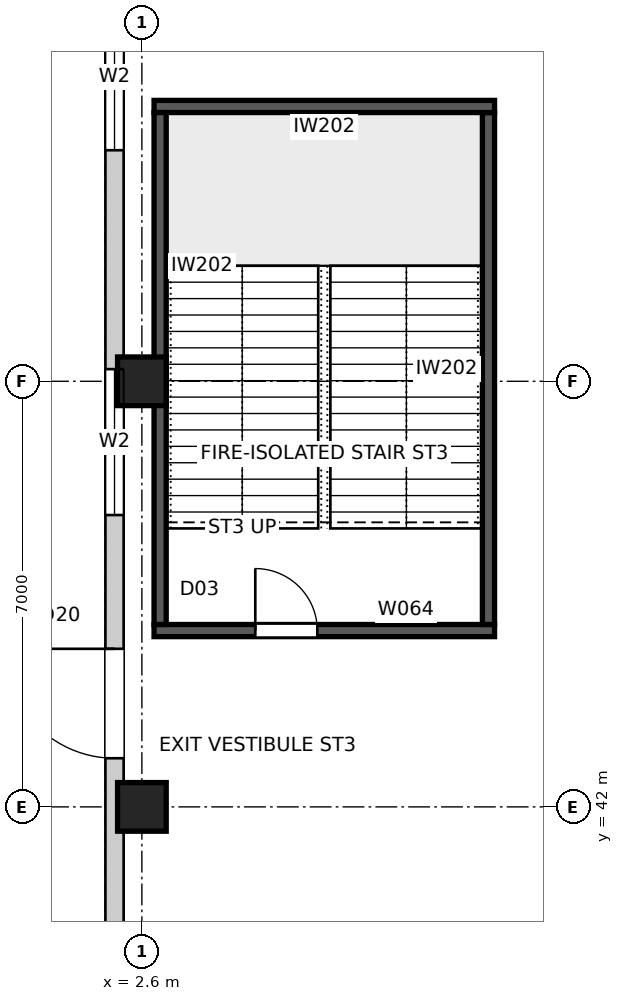
"""IFC4 building model, lengths in metres.
Left out: names, types, materials, properties, quantities, classifications, styles, units other than length and angle.
Written with IfcOpenShell. Run it as: python <this file> out.ifc"""

import sys

from ifc_helpers import new_model, si_unit, direction, frame, frame_2d, origin, origin_2d, place, context, subcontext, project, spatial, rectangle, extrude, element, fill, save


model = new_model("IFC4")
c1 = context("Model", 3, precision=1e-05, world=origin(), true_north=direction((0.0, 1.0)))
c2 = subcontext(c1, "Body", "Model", "MODEL_VIEW")
j1 = project(units=[si_unit("LENGTHUNIT", "METRE"), si_unit("PLANEANGLEUNIT", "RADIAN")], contexts=[c1])
p1 = place(None, origin())
s1 = spatial("IfcSite", under=j1, at=p1, CompositionType="ELEMENT")
p2 = place(p1, origin())
s2 = spatial("IfcBuilding", under=s1, at=p2, CompositionType="ELEMENT")
p3 = place(p2, origin())
s3 = spatial("IfcBuildingStorey", under=s2, at=p3, CompositionType="ELEMENT", Elevation=0.0)
for number, where, z_axis, x_axis in (
    (1, (2.6, 42.0, 0.0), (0.0, 0.0, 1.0), (1.0, 0.0, 0.0)),
    (2, (2.6, 49.0, 0.0), (0.0, 0.0, 1.0), (1.0, 0.0, 0.0)),
):
    element("IfcColumn", number, at=place(p3, frame(where, z_axis=z_axis, x_axis=x_axis)), inside=s3, PredefinedType="COLUMN", context=c2, shape_type="SweptSolid", body=[
        extrude(rectangle(XDim=0.8, YDim=0.8, at=origin_2d()), origin(), (0.0, 0.0, 1.0), 6.0),
    ])
p4 = place(p3, frame((2.15, 57.0, 0.0), z_axis=(0.0, 0.0, 1.0), x_axis=(0.0, -1.0, 0.0)))
e3 = element("IfcWall", 3, at=p4, inside=s3, PredefinedType="SOLIDWALL", context=c2, shape_type="SweptSolid", body=[
    extrude(rectangle(XDim=54.0, YDim=0.3, at=frame_2d((27.0, 0.0))), origin(), (0.0, 0.0, 1.0), 5.65),
])
p5 = place(p4, frame((12.4, 0.0, 0.0)))
e4 = element("IfcOpeningElement", 4, at=p5, cuts=e3, PredefinedType="OPENING", context=c2, shape_type="SweptSolid", body=[
    extrude(rectangle(XDim=1.8, YDim=2.7, at=frame_2d((0.9, 1.35))), frame((0.0, 0.16, 0.0), z_axis=(0.0, -1.0, 0.0), x_axis=(1.0, 0.0, 0.0)), (0.0, 0.0, 1.0), 0.32),
])
p6 = place(p4, frame((1.8, 0.0, 0.6)))
e5 = element("IfcOpeningElement", 5, at=p6, cuts=e3, PredefinedType="OPENING", context=c2, shape_type="SweptSolid", body=[
    extrude(rectangle(XDim=2.4, YDim=3.6, at=frame_2d((1.2, 1.8))), frame((0.0, 0.16, 0.0), z_axis=(0.0, -1.0, 0.0), x_axis=(1.0, 0.0, 0.0)), (0.0, 0.0, 1.0), 0.32),
])
p7 = place(p4, frame((7.8, 0.0, 0.6)))
e6 = element("IfcOpeningElement", 6, at=p7, cuts=e3, PredefinedType="OPENING", context=c2, shape_type="SweptSolid", body=[
    extrude(rectangle(XDim=2.4, YDim=3.6, at=frame_2d((1.2, 1.8))), frame((0.0, 0.16, 0.0), z_axis=(0.0, -1.0, 0.0), x_axis=(1.0, 0.0, 0.0)), (0.0, 0.0, 1.0), 0.32),
])
p8 = place(p4, frame((20.1, 0.0, 0.0)))
e7 = element("IfcOpeningElement", 7, at=p8, cuts=e3, PredefinedType="OPENING", context=c2, shape_type="SweptSolid", body=[
    extrude(rectangle(XDim=1.8, YDim=2.7, at=frame_2d((0.9, 1.35))), frame((0.0, 0.16, 0.0), z_axis=(0.0, -1.0, 0.0), x_axis=(1.0, 0.0, 0.0)), (0.0, 0.0, 1.0), 0.32),
])
p9 = place(p4, frame((25.8, 0.0, 0.6)))
e8 = element("IfcOpeningElement", 8, at=p9, cuts=e3, PredefinedType="OPENING", context=c2, shape_type="SweptSolid", body=[
    extrude(rectangle(XDim=2.4, YDim=3.6, at=frame_2d((1.2, 1.8))), frame((0.0, 0.16, 0.0), z_axis=(0.0, -1.0, 0.0), x_axis=(1.0, 0.0, 0.0)), (0.0, 0.0, 1.0), 0.32),
])
p10 = place(p4, frame((32.1, 0.0, 0.0)))
e9 = element("IfcOpeningElement", 9, at=p10, cuts=e3, PredefinedType="OPENING", context=c2, shape_type="SweptSolid", body=[
    extrude(rectangle(XDim=1.8, YDim=2.7, at=frame_2d((0.9, 1.35))), frame((0.0, 0.16, 0.0), z_axis=(0.0, -1.0, 0.0), x_axis=(1.0, 0.0, 0.0)), (0.0, 0.0, 1.0), 0.32),
])
p11 = place(p4, frame((37.8, 0.0, 0.6)))
e10 = element("IfcOpeningElement", 10, at=p11, cuts=e3, PredefinedType="OPENING", context=c2, shape_type="SweptSolid", body=[
    extrude(rectangle(XDim=2.4, YDim=3.6, at=frame_2d((1.2, 1.8))), frame((0.0, 0.16, 0.0), z_axis=(0.0, -1.0, 0.0), x_axis=(1.0, 0.0, 0.0)), (0.0, 0.0, 1.0), 0.32),
])
p12 = place(p4, frame((43.8, 0.0, 0.6)))
e11 = element("IfcOpeningElement", 11, at=p12, cuts=e3, PredefinedType="OPENING", context=c2, shape_type="SweptSolid", body=[
    extrude(rectangle(XDim=2.4, YDim=3.6, at=frame_2d((1.2, 1.8))), frame((0.0, 0.16, 0.0), z_axis=(0.0, -1.0, 0.0), x_axis=(1.0, 0.0, 0.0)), (0.0, 0.0, 1.0), 0.32),
])
p13 = place(p4, frame((50.1, 0.0, 0.0)))
e12 = element("IfcOpeningElement", 12, at=p13, cuts=e3, PredefinedType="OPENING", context=c2, shape_type="SweptSolid", body=[
    extrude(rectangle(XDim=1.8, YDim=2.7, at=frame_2d((0.9, 1.35))), frame((0.0, 0.16, 0.0), z_axis=(0.0, -1.0, 0.0), x_axis=(1.0, 0.0, 0.0)), (0.0, 0.0, 1.0), 0.32),
])
p14 = place(p3, frame((2.8, 44.9, 0.0), z_axis=(0.0, 0.0, 1.0), x_axis=(1.0, 0.0, 0.0)))
e13 = element("IfcWall", 13, at=p14, inside=s3, PredefinedType="SOLIDWALL", context=c2, shape_type="SweptSolid", body=[
    extrude(rectangle(XDim=5.6, YDim=0.2, at=frame_2d((2.8, 0.0))), origin(), (0.0, 0.0, 1.0), 5.65),
])
p15 = place(p14, frame((1.665, 0.0, 0.0)))
e14 = element("IfcOpeningElement", 14, at=p15, cuts=e13, PredefinedType="OPENING", context=c2, shape_type="SweptSolid", body=[
    extrude(rectangle(XDim=1.02, YDim=2.1, at=frame_2d((0.51, 1.05))), frame((0.0, 0.11, 0.0), z_axis=(0.0, -1.0, 0.0), x_axis=(1.0, 0.0, 0.0)), (0.0, 0.0, 1.0), 0.22),
])
p16 = place(p3, frame((8.3, 45.0, 0.0), z_axis=(0.0, 0.0, 1.0), x_axis=(0.0, 1.0, 0.0)))
e15 = element("IfcWall", 15, at=p16, inside=s3, PredefinedType="SOLIDWALL", context=c2, shape_type="SweptSolid", body=[
    extrude(rectangle(XDim=8.42, YDim=0.2, at=frame_2d((4.21, 0.0))), origin(), (0.0, 0.0, 1.0), 5.65),
])
p17 = place(p3, frame((8.4, 53.52, 0.0), z_axis=(0.0, 0.0, 1.0), x_axis=(-1.0, 0.0, 0.0)))
e16 = element("IfcWall", 16, at=p17, inside=s3, PredefinedType="SOLIDWALL", context=c2, shape_type="SweptSolid", body=[
    extrude(rectangle(XDim=5.6, YDim=0.2, at=frame_2d((2.8, 0.0))), origin(), (0.0, 0.0, 1.0), 5.65),
])
p18 = place(p3, frame((2.9, 53.42, 0.0), z_axis=(0.0, 0.0, 1.0), x_axis=(0.0, -1.0, 0.0)))
e17 = element("IfcWall", 17, at=p18, inside=s3, PredefinedType="SOLIDWALL", context=c2, shape_type="SweptSolid", body=[
    extrude(rectangle(XDim=8.42, YDim=0.2, at=frame_2d((4.21, 0.0))), origin(), (0.0, 0.0, 1.0), 5.65),
])
p19 = place(p5, frame((1.8, 0.0, 0.0), z_axis=(0.0, 0.0, 1.0), x_axis=(-1.0, 0.0, 0.0)))
e18 = element("IfcDoor", 18, at=p19, inside=s3, OperationType="DOUBLE_DOOR_DOUBLE_SWING", PredefinedType="DOOR", context=c2, shape_type="SweptSolid", body=[
    extrude(rectangle(XDim=1.8, YDim=2.7, at=frame_2d((0.9, 1.35))), frame((0.0, 0.025, 0.0), z_axis=(0.0, -1.0, 0.0), x_axis=(1.0, 0.0, 0.0)), (0.0, 0.0, 1.0), 0.05),
])
fill(e4, e18)
p20 = place(p6, origin())
e19 = element("IfcWindow", 19, at=p20, inside=s3, PartitioningType="SINGLE_PANEL", PredefinedType="WINDOW", context=c2, shape_type="SweptSolid", body=[
    extrude(rectangle(XDim=2.4, YDim=3.6, at=frame_2d((1.2, 1.8))), frame((0.0, 0.03, 0.0), z_axis=(0.0, -1.0, 0.0), x_axis=(1.0, 0.0, 0.0)), (0.0, 0.0, 1.0), 0.06),
])
fill(e5, e19)
p21 = place(p7, origin())
e20 = element("IfcWindow", 20, at=p21, inside=s3, PartitioningType="SINGLE_PANEL", PredefinedType="WINDOW", context=c2, shape_type="SweptSolid", body=[
    extrude(rectangle(XDim=2.4, YDim=3.6, at=frame_2d((1.2, 1.8))), frame((0.0, 0.03, 0.0), z_axis=(0.0, -1.0, 0.0), x_axis=(1.0, 0.0, 0.0)), (0.0, 0.0, 1.0), 0.06),
])
fill(e6, e20)
p22 = place(p15, origin())
e21 = element("IfcDoor", 21, at=p22, inside=s3, OperationType="SINGLE_SWING_LEFT", PredefinedType="DOOR", context=c2, shape_type="SweptSolid", body=[
    extrude(rectangle(XDim=1.02, YDim=2.1, at=frame_2d((0.51, 1.05))), frame((0.0, 0.025, 0.0), z_axis=(0.0, -1.0, 0.0), x_axis=(1.0, 0.0, 0.0)), (0.0, 0.0, 1.0), 0.05),
])
fill(e14, e21)
save(model, sys.argv[1])
